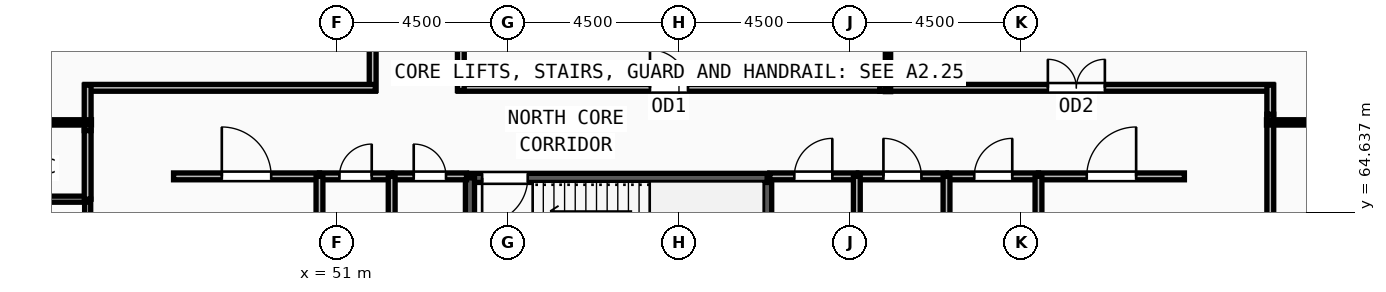
"""IFC4 building model, lengths in metres.
Left out: names, types, materials, properties, quantities, classifications, styles, units other than length and angle.
Written with IfcOpenShell. Run it as: python <this file> out.ifc"""

import sys

from ifc_helpers import new_model, si_unit, direction, frame, frame_2d, origin, place, context, subcontext, project, spatial, rectangle, extrude, source, transform, mapped, element, fill, save


model = new_model("IFC4")
c1 = context("Model", 3, precision=1e-05, world=origin(), true_north=direction((0.0, 1.0)))
c2 = subcontext(c1, "Body", "Model", "MODEL_VIEW")
j1 = project(units=[si_unit("LENGTHUNIT", "METRE"), si_unit("PLANEANGLEUNIT", "RADIAN")], contexts=[c1])
p1 = place(None, origin())
s1 = spatial("IfcSite", under=j1, at=p1, CompositionType="ELEMENT")
p2 = place(p1, origin())
s2 = spatial("IfcBuilding", under=s1, at=p2, CompositionType="ELEMENT")
p3 = place(p2, frame((0.0, 0.0, 286.5)))
s3 = spatial("IfcBuildingStorey", under=s2, at=p3, CompositionType="ELEMENT", Elevation=286.5)
p4 = place(p3, frame((62.32, 62.1, 0.0), z_axis=(0.0, 0.0, 1.0), x_axis=(0.0, 1.0, 0.0)))
e1 = element("IfcWall", 1, at=p4, inside=s3, PredefinedType="SOLIDWALL", context=c2, shape_type="SweptSolid", body=[
    extrude(rectangle(XDim=3.44, YDim=0.24, at=frame_2d((1.72, 0.0))), origin(), (0.0, 0.0, 1.0), 3.57),
])
p5 = place(p3, frame((62.32, 65.54, 0.0), z_axis=(0.0, 0.0, 1.0), x_axis=(-1.0, 0.0, 0.0)))
e2 = element("IfcWall", 2, at=p5, inside=s3, PredefinedType="SOLIDWALL", context=c2, shape_type="SweptSolid", body=[
    extrude(rectangle(XDim=7.82, YDim=0.24, at=frame_2d((3.91, 0.0))), origin(), (0.0, 0.0, 1.0), 3.57),
])
m1 = source(origin(), c2, "Body", "SweptSolid", [
    extrude(rectangle(XDim=1.2, YDim=2.2, at=frame_2d((0.6, 1.1))), frame((0.0, 0.13, 0.0), z_axis=(0.0, -1.0, 0.0), x_axis=(1.0, 0.0, 0.0)), (0.0, 0.0, 1.0), 0.26),
])
p6 = place(p5, frame((6.3, 0.0, 0.0)))
e3 = element("IfcOpeningElement", 3, at=p6, cuts=e2, PredefinedType="OPENING", context=c2, shape_type="MappedRepresentation", body=[
    mapped(m1, transform((0.0, 0.0, 0.0), x_axis=(1.0, 0.0, 0.0), y_axis=(0.0, 1.0, 0.0), z_axis=(0.0, 0.0, 1.0), scale=1.0)),
])
p7 = place(p3, frame((54.5, 65.54, 0.0), z_axis=(0.0, 0.0, 1.0), x_axis=(0.0, -1.0, 0.0)))
e4 = element("IfcWall", 4, at=p7, inside=s3, PredefinedType="SOLIDWALL", context=c2, shape_type="SweptSolid", body=[
    extrude(rectangle(XDim=3.44, YDim=0.24, at=frame_2d((1.72, 0.0))), origin(), (0.0, 0.0, 1.0), 3.57),
])
p8 = place(p3, frame((44.44, 62.24, 0.0), z_axis=(0.0, 0.0, 1.0), x_axis=(0.0, 1.0, 0.0)))
e5 = element("IfcWall", 5, at=p8, inside=s3, PredefinedType="PARTITIONING", context=c2, shape_type="SweptSolid", body=[
    extrude(rectangle(XDim=2.74, YDim=0.16, at=frame_2d((1.37, 0.0))), origin(), (0.0, 0.0, 1.0), 3.57),
])
m2 = source(origin(), c2, "Body", "SweptSolid", [
    extrude(rectangle(XDim=1.05, YDim=2.15, at=frame_2d((0.525, 1.075))), frame((0.0, 0.09, 0.0), z_axis=(0.0, -1.0, 0.0), x_axis=(1.0, 0.0, 0.0)), (0.0, 0.0, 1.0), 0.18),
])
p9 = place(p8, frame((0.845, 0.0, 0.0)))
e6 = element("IfcOpeningElement", 6, at=p9, cuts=e5, PredefinedType="OPENING", context=c2, shape_type="MappedRepresentation", body=[
    mapped(m2, transform((0.0, 0.0, 0.0), x_axis=(1.0, 0.0, 0.0), y_axis=(0.0, 1.0, 0.0), z_axis=(0.0, 0.0, 1.0), scale=1.0)),
])
p10 = place(p3, frame((50.54, 65.58, 0.0), z_axis=(0.0, 0.0, 1.0), x_axis=(1.0, 0.0, 0.0)))
e7 = element("IfcWall", 7, at=p10, inside=s3, PredefinedType="PARTITIONING", context=c2, shape_type="SweptSolid", body=[
    extrude(rectangle(XDim=1.9, YDim=0.18, at=frame_2d((0.95, 0.0))), origin(), (0.0, 0.0, 1.0), 3.57),
])
m3 = source(origin(), c2, "Body", "SweptSolid", [
    extrude(rectangle(XDim=0.85, YDim=2.1, at=frame_2d((0.425, 1.05))), frame((0.0, 0.1, 0.0), z_axis=(0.0, -1.0, 0.0), x_axis=(1.0, 0.0, 0.0)), (0.0, 0.0, 1.0), 0.2),
])
p11 = place(p10, frame((0.525, 0.0, 0.0)))
e8 = element("IfcOpeningElement", 8, at=p11, cuts=e7, PredefinedType="OPENING", context=c2, shape_type="MappedRepresentation", body=[
    mapped(m3, transform((0.0, 0.0, 0.0), x_axis=(1.0, 0.0, 0.0), y_axis=(0.0, 1.0, 0.0), z_axis=(0.0, 0.0, 1.0), scale=1.0)),
])
p12 = place(p3, frame((52.48, 65.58, 0.0), z_axis=(0.0, 0.0, 1.0), x_axis=(1.0, 0.0, 0.0)))
e9 = element("IfcWall", 9, at=p12, inside=s3, PredefinedType="PARTITIONING", context=c2, shape_type="SweptSolid", body=[
    extrude(rectangle(XDim=1.93, YDim=0.18, at=frame_2d((0.965, 0.0))), origin(), (0.0, 0.0, 1.0), 3.57),
])
p13 = place(p12, frame((0.54, 0.0, 0.0)))
e10 = element("IfcOpeningElement", 10, at=p13, cuts=e9, PredefinedType="OPENING", context=c2, shape_type="MappedRepresentation", body=[
    mapped(m3, transform((0.0, 0.0, 0.0), x_axis=(1.0, 0.0, 0.0), y_axis=(0.0, 1.0, 0.0), z_axis=(0.0, 0.0, 1.0), scale=1.0)),
])
p14 = place(p3, frame((62.39, 65.58, 0.0), z_axis=(0.0, 0.0, 1.0), x_axis=(1.0, 0.0, 0.0)))
e11 = element("IfcWall", 11, at=p14, inside=s3, PredefinedType="PARTITIONING", context=c2, shape_type="SweptSolid", body=[
    extrude(rectangle(XDim=2.29, YDim=0.18, at=frame_2d((1.145, 0.0))), origin(), (0.0, 0.0, 1.0), 3.57),
])
m4 = source(origin(), c2, "Body", "SweptSolid", [
    extrude(rectangle(XDim=1.0, YDim=2.2, at=frame_2d((0.5, 1.1))), frame((0.0, 0.1, 0.0), z_axis=(0.0, -1.0, 0.0), x_axis=(1.0, 0.0, 0.0)), (0.0, 0.0, 1.0), 0.2),
])
p15 = place(p14, frame((0.645, 0.0, 0.0)))
e12 = element("IfcOpeningElement", 12, at=p15, cuts=e11, PredefinedType="OPENING", context=c2, shape_type="MappedRepresentation", body=[
    mapped(m4, transform((0.0, 0.0, 0.0), x_axis=(1.0, 0.0, 0.0), y_axis=(0.0, 1.0, 0.0), z_axis=(0.0, 0.0, 1.0), scale=1.0)),
])
p16 = place(p3, frame((64.72, 65.58, 0.0), z_axis=(0.0, 0.0, 1.0), x_axis=(1.0, 0.0, 0.0)))
e13 = element("IfcWall", 13, at=p16, inside=s3, PredefinedType="PARTITIONING", context=c2, shape_type="SweptSolid", body=[
    extrude(rectangle(XDim=2.32, YDim=0.18, at=frame_2d((1.16, 0.0))), origin(), (0.0, 0.0, 1.0), 3.57),
])
p17 = place(p16, frame((0.66, 0.0, 0.0)))
e14 = element("IfcOpeningElement", 14, at=p17, cuts=e13, PredefinedType="OPENING", context=c2, shape_type="MappedRepresentation", body=[
    mapped(m4, transform((0.0, 0.0, 0.0), x_axis=(1.0, 0.0, 0.0), y_axis=(0.0, 1.0, 0.0), z_axis=(0.0, 0.0, 1.0), scale=1.0)),
])
p18 = place(p3, frame((67.08, 65.58, 0.0), z_axis=(0.0, 0.0, 1.0), x_axis=(1.0, 0.0, 0.0)))
e15 = element("IfcWall", 15, at=p18, inside=s3, PredefinedType="PARTITIONING", context=c2, shape_type="SweptSolid", body=[
    extrude(rectangle(XDim=2.38, YDim=0.18, at=frame_2d((1.19, 0.0))), origin(), (0.0, 0.0, 1.0), 3.57),
])
p19 = place(p18, frame((0.69, 0.0, 0.0)))
e16 = element("IfcOpeningElement", 16, at=p19, cuts=e15, PredefinedType="OPENING", context=c2, shape_type="MappedRepresentation", body=[
    mapped(m4, transform((0.0, 0.0, 0.0), x_axis=(1.0, 0.0, 0.0), y_axis=(0.0, 1.0, 0.0), z_axis=(0.0, 0.0, 1.0), scale=1.0)),
])
p20 = place(p3, frame((46.7, 65.58, 0.0), z_axis=(0.0, 0.0, 1.0), x_axis=(1.0, 0.0, 0.0)))
e17 = element("IfcWall", 17, at=p20, inside=s3, PredefinedType="PARTITIONING", context=c2, shape_type="SweptSolid", body=[
    extrude(rectangle(XDim=3.84, YDim=0.18, at=frame_2d((1.92, 0.0))), origin(), (0.0, 0.0, 1.0), 3.57),
])
m5 = source(origin(), c2, "Body", "SweptSolid", [
    extrude(rectangle(XDim=1.3, YDim=2.2, at=frame_2d((0.65, 1.1))), frame((0.0, 0.1, 0.0), z_axis=(0.0, -1.0, 0.0), x_axis=(1.0, 0.0, 0.0)), (0.0, 0.0, 1.0), 0.2),
])
p21 = place(p20, frame((1.27, 0.0, 0.0)))
e18 = element("IfcOpeningElement", 18, at=p21, cuts=e17, PredefinedType="OPENING", context=c2, shape_type="MappedRepresentation", body=[
    mapped(m5, transform((0.0, 0.0, 0.0), x_axis=(1.0, 0.0, 0.0), y_axis=(0.0, 1.0, 0.0), z_axis=(0.0, 0.0, 1.0), scale=1.0)),
])
p22 = place(p3, frame((69.46, 65.58, 0.0), z_axis=(0.0, 0.0, 1.0), x_axis=(1.0, 0.0, 0.0)))
e19 = element("IfcWall", 19, at=p22, inside=s3, PredefinedType="PARTITIONING", context=c2, shape_type="SweptSolid", body=[
    extrude(rectangle(XDim=3.84, YDim=0.18, at=frame_2d((1.92, 0.0))), origin(), (0.0, 0.0, 1.0), 3.57),
])
p23 = place(p22, frame((1.27, 0.0, 0.0)))
e20 = element("IfcOpeningElement", 20, at=p23, cuts=e19, PredefinedType="OPENING", context=c2, shape_type="MappedRepresentation", body=[
    mapped(m5, transform((0.0, 0.0, 0.0), x_axis=(1.0, 0.0, 0.0), y_axis=(0.0, 1.0, 0.0), z_axis=(0.0, 0.0, 1.0), scale=1.0)),
])
p24 = place(p3, frame((75.56, 67.215, 0.0), z_axis=(0.0, 0.0, 1.0), x_axis=(0.0, -1.0, 0.0)))
e21 = element("IfcWall", 21, at=p24, inside=s3, PredefinedType="PARTITIONING", context=c2, shape_type="SweptSolid", body=[
    extrude(rectangle(XDim=13.93, YDim=0.18, at=frame_2d((6.965, 0.0))), origin(), (0.0, 0.0, 1.0), 3.57),
])
m6 = source(origin(), c2, "Body", "SweptSolid", [
    extrude(rectangle(XDim=1.5, YDim=2.2, at=frame_2d((0.75, 1.1))), frame((0.0, 0.1, 0.0), z_axis=(0.0, -1.0, 0.0), x_axis=(1.0, 0.0, 0.0)), (0.0, 0.0, 1.0), 0.2),
])
p25 = place(p24, frame((6.215, 0.0, 0.0)))
e22 = element("IfcOpeningElement", 22, at=p25, cuts=e21, PredefinedType="OPENING", context=c2, shape_type="MappedRepresentation", body=[
    mapped(m6, transform((0.0, 0.0, 0.0), x_axis=(1.0, 0.0, 0.0), y_axis=(0.0, 1.0, 0.0), z_axis=(0.0, 0.0, 1.0), scale=1.0)),
])
p26 = place(p3, frame((65.285, 67.91, 0.0), z_axis=(0.0, 0.0, 1.0), x_axis=(1.0, 0.0, 0.0)))
e23 = element("IfcWall", 23, at=p26, inside=s3, PredefinedType="PARTITIONING", context=c2, shape_type="SweptSolid", body=[
    extrude(rectangle(XDim=10.345, YDim=0.18, at=frame_2d((5.172, 0.0))), origin(), (0.0, 0.0, 1.0), 3.261),
])
p27 = place(p26, frame((4.422, 0.0, 0.0)))
e24 = element("IfcOpeningElement", 24, at=p27, cuts=e23, PredefinedType="OPENING", context=c2, shape_type="MappedRepresentation", body=[
    mapped(m6, transform((0.0, 0.0, 0.0), x_axis=(1.0, 0.0, 0.0), y_axis=(0.0, 1.0, 0.0), z_axis=(0.0, 0.0, 1.0), scale=1.0)),
])
p28 = place(p3, frame((54.19, 67.91, 0.0), z_axis=(0.0, 0.0, 1.0), x_axis=(1.0, 0.0, 0.0)))
e25 = element("IfcWall", 25, at=p28, inside=s3, PredefinedType="PARTITIONING", context=c2, shape_type="SweptSolid", body=[
    extrude(rectangle(XDim=11.095, YDim=0.18, at=frame_2d((5.547, 0.0))), origin(), (0.0, 0.0, 1.0), 3.261),
])
p29 = place(p28, frame((5.047, 0.0, 0.0)))
e26 = element("IfcOpeningElement", 26, at=p29, cuts=e25, PredefinedType="OPENING", context=c2, shape_type="MappedRepresentation", body=[
    mapped(m4, transform((0.0, 0.0, 0.0), x_axis=(1.0, 0.0, 0.0), y_axis=(0.0, 1.0, 0.0), z_axis=(0.0, 0.0, 1.0), scale=1.0)),
])
p30 = place(p3, frame((51.94, 67.84, 0.0), z_axis=(0.0, 0.0, 1.0), x_axis=(0.0, 1.0, 0.0)))
e27 = element("IfcWall", 27, at=p30, inside=s3, PredefinedType="PARTITIONING", context=c2, shape_type="SweptSolid", body=[
    extrude(rectangle(XDim=8.437, YDim=0.18, at=frame_2d((4.219, 0.0))), origin(), (0.0, 0.0, 1.0), 3.57),
])
p31 = place(p30, frame((3.468, 0.0, 0.0)))
e28 = element("IfcOpeningElement", 28, at=p31, cuts=e27, PredefinedType="OPENING", context=c2, shape_type="MappedRepresentation", body=[
    mapped(m6, transform((0.0, 0.0, 0.0), x_axis=(1.0, 0.0, 0.0), y_axis=(0.0, 1.0, 0.0), z_axis=(0.0, 0.0, 1.0), scale=1.0)),
])
p32 = place(p3, frame((39.98, 64.98, 0.0), z_axis=(0.0, 0.0, 1.0), x_axis=(1.0, 0.0, 0.0)))
e29 = element("IfcWall", 29, at=p32, inside=s3, PredefinedType="PARTITIONING", context=c2, shape_type="SweptSolid", body=[
    extrude(rectangle(XDim=4.46, YDim=0.16, at=frame_2d((2.23, 0.0))), origin(), (0.0, 0.0, 1.0), 3.57),
])
p33 = place(p3, frame((50.54, 61.95, 0.0), z_axis=(0.0, 0.0, 1.0), x_axis=(0.0, 1.0, 0.0)))
e30 = element("IfcWall", 30, at=p33, inside=s3, PredefinedType="PARTITIONING", context=c2, shape_type="SweptSolid", body=[
    extrude(rectangle(XDim=3.63, YDim=0.18, at=frame_2d((1.815, 0.0))), origin(), (0.0, 0.0, 1.0), 3.57),
])
for number, where, z_axis, x_axis in (
    (31, (52.44, 61.775, 0.0), (0.0, 0.0, 1.0), (0.0, 1.0, 0.0)),
    (32, (64.68, 61.775, 0.0), (0.0, 0.0, 1.0), (0.0, 1.0, 0.0)),
    (33, (67.04, 61.775, 0.0), (0.0, 0.0, 1.0), (0.0, 1.0, 0.0)),
):
    element("IfcWall", number, at=place(p3, frame(where, z_axis=z_axis, x_axis=x_axis)), inside=s3, PredefinedType="PARTITIONING", context=c2, shape_type="SweptSolid", body=[
        extrude(rectangle(XDim=3.805, YDim=0.18, at=frame_2d((1.903, 0.0))), origin(), (0.0, 0.0, 1.0), 3.57),
    ])
p34 = place(p3, frame((69.46, 61.95, 0.0), z_axis=(0.0, 0.0, 1.0), x_axis=(0.0, 1.0, 0.0)))
e34 = element("IfcWall", 34, at=p34, inside=s3, PredefinedType="PARTITIONING", context=c2, shape_type="SweptSolid", body=[
    extrude(rectangle(XDim=3.63, YDim=0.18, at=frame_2d((1.815, 0.0))), origin(), (0.0, 0.0, 1.0), 3.57),
])
p35 = place(p3, frame((75.56, 67.98, 0.0), z_axis=(0.0, 0.0, 1.0), x_axis=(0.0, -1.0, 0.0)))
e35 = element("IfcWall", 35, at=p35, inside=s3, PredefinedType="PARTITIONING", context=c2, shape_type="SweptSolid", body=[
    extrude(rectangle(XDim=0.765, YDim=0.18, at=frame_2d((0.382, 0.0))), origin(), (0.0, 0.0, 1.0), 3.57),
])
p36 = place(p3, frame((54.26, 76.431, 0.0), z_axis=(0.0, 0.0, 1.0), x_axis=(0.0, -1.0, 0.0)))
e36 = element("IfcWall", 36, at=p36, inside=s3, PredefinedType="PARTITIONING", context=c2, shape_type="SweptSolid", body=[
    extrude(rectangle(XDim=8.591, YDim=0.18, at=frame_2d((4.295, 0.0))), origin(), (0.0, 0.0, 1.0), 3.57),
])
p37 = place(p3, frame((44.37, 67.91, 0.0), z_axis=(0.0, 0.0, 1.0), x_axis=(1.0, 0.0, 0.0)))
e37 = element("IfcWall", 37, at=p37, inside=s3, PredefinedType="PARTITIONING", context=c2, shape_type="SweptSolid", body=[
    extrude(rectangle(XDim=7.64, YDim=0.18, at=frame_2d((3.82, 0.0))), origin(), (0.0, 0.0, 1.0), 3.57),
])
p38 = place(p3, frame((44.44, 66.785, 0.0), z_axis=(0.0, 0.0, 1.0), x_axis=(0.0, 1.0, 0.0)))
e38 = element("IfcWall", 38, at=p38, inside=s3, PredefinedType="PARTITIONING", context=c2, shape_type="SweptSolid", body=[
    extrude(rectangle(XDim=1.195, YDim=0.18, at=frame_2d((0.598, 0.0))), origin(), (0.0, 0.0, 1.0), 3.57),
])
p39 = place(p3, frame((44.44, 64.98, 0.0), z_axis=(0.0, 0.0, 1.0), x_axis=(0.0, 1.0, 0.0)))
e39 = element("IfcWall", 39, at=p39, inside=s3, PredefinedType="PARTITIONING", context=c2, shape_type="SweptSolid", body=[
    extrude(rectangle(XDim=1.805, YDim=0.18, at=frame_2d((0.902, 0.0))), origin(), (0.0, 0.0, 1.0), 3.57),
])
for number, where, z_axis, x_axis in (
    (40, (44.54, 67.0, 0.0), (0.0, 0.0, 1.0), (-1.0, 0.0, 0.0)),
    (41, (75.46, 67.0, 0.0), (0.0, 0.0, 1.0), (1.0, 0.0, 0.0)),
):
    element("IfcWall", number, at=place(p3, frame(where, z_axis=z_axis, x_axis=x_axis)), inside=s3, PredefinedType="PARTITIONING", context=c2, shape_type="SweptSolid", body=[
        extrude(rectangle(XDim=15.021, YDim=0.14, at=frame_2d((7.51, 0.0))), origin(), (0.0, 0.0, 1.0), 3.57),
    ])
p40 = place(p3, frame((65.5, 67.81, 0.0), z_axis=(0.0, 0.0, 1.0), x_axis=(0.0, 1.0, 0.0)))
e42 = element("IfcWall", 42, at=p40, inside=s3, PredefinedType="PARTITIONING", context=c2, shape_type="SweptSolid", body=[
    extrude(rectangle(XDim=8.999, YDim=0.14, at=frame_2d((4.5, 0.0))), origin(), (0.0, 0.0, 1.0), 3.57),
])
m7 = source(origin(), c2, "Body", "SweptSolid", [
    extrude(rectangle(XDim=1.2, YDim=2.2, at=frame_2d((0.6, 1.1))), frame((0.0, 0.025, 0.0), z_axis=(0.0, -1.0, 0.0), x_axis=(1.0, 0.0, 0.0)), (0.0, 0.0, 1.0), 0.05),
])
p41 = place(p6, origin())
e43 = element("IfcDoor", 43, at=p41, inside=s3, OperationType="SINGLE_SWING_RIGHT", PredefinedType="DOOR", context=c2, shape_type="MappedRepresentation", body=[
    mapped(m7, transform((0.0, 0.0, 0.0), x_axis=(1.0, 0.0, 0.0), y_axis=(0.0, 1.0, 0.0), z_axis=(0.0, 0.0, 1.0), scale=1.0)),
])
fill(e3, e43)
m8 = source(origin(), c2, "Body", "SweptSolid", [
    extrude(rectangle(XDim=0.85, YDim=2.1, at=frame_2d((0.425, 1.05))), frame((0.0, 0.025, 0.0), z_axis=(0.0, -1.0, 0.0), x_axis=(1.0, 0.0, 0.0)), (0.0, 0.0, 1.0), 0.05),
])
p42 = place(p11, origin())
e44 = element("IfcDoor", 44, at=p42, inside=s3, OperationType="SINGLE_SWING_RIGHT", PredefinedType="DOOR", context=c2, shape_type="MappedRepresentation", body=[
    mapped(m8, transform((0.0, 0.0, 0.0), x_axis=(1.0, 0.0, 0.0), y_axis=(0.0, 1.0, 0.0), z_axis=(0.0, 0.0, 1.0), scale=1.0)),
])
fill(e8, e44)
p43 = place(p13, origin())
e45 = element("IfcDoor", 45, at=p43, inside=s3, OperationType="SINGLE_SWING_LEFT", PredefinedType="DOOR", context=c2, shape_type="MappedRepresentation", body=[
    mapped(m8, transform((0.0, 0.0, 0.0), x_axis=(1.0, 0.0, 0.0), y_axis=(0.0, 1.0, 0.0), z_axis=(0.0, 0.0, 1.0), scale=1.0)),
])
fill(e10, e45)
m9 = source(origin(), c2, "Body", "SweptSolid", [
    extrude(rectangle(XDim=1.0, YDim=2.2, at=frame_2d((0.5, 1.1))), frame((0.0, 0.025, 0.0), z_axis=(0.0, -1.0, 0.0), x_axis=(1.0, 0.0, 0.0)), (0.0, 0.0, 1.0), 0.05),
])
p44 = place(p15, origin())
e46 = element("IfcDoor", 46, at=p44, inside=s3, OperationType="SINGLE_SWING_RIGHT", PredefinedType="DOOR", context=c2, shape_type="MappedRepresentation", body=[
    mapped(m9, transform((0.0, 0.0, 0.0), x_axis=(1.0, 0.0, 0.0), y_axis=(0.0, 1.0, 0.0), z_axis=(0.0, 0.0, 1.0), scale=1.0)),
])
fill(e12, e46)
p45 = place(p17, origin())
e47 = element("IfcDoor", 47, at=p45, inside=s3, OperationType="SINGLE_SWING_LEFT", PredefinedType="DOOR", context=c2, shape_type="MappedRepresentation", body=[
    mapped(m9, transform((0.0, 0.0, 0.0), x_axis=(1.0, 0.0, 0.0), y_axis=(0.0, 1.0, 0.0), z_axis=(0.0, 0.0, 1.0), scale=1.0)),
])
fill(e14, e47)
p46 = place(p19, origin())
e48 = element("IfcDoor", 48, at=p46, inside=s3, OperationType="SINGLE_SWING_RIGHT", PredefinedType="DOOR", context=c2, shape_type="MappedRepresentation", body=[
    mapped(m9, transform((0.0, 0.0, 0.0), x_axis=(1.0, 0.0, 0.0), y_axis=(0.0, 1.0, 0.0), z_axis=(0.0, 0.0, 1.0), scale=1.0)),
])
fill(e16, e48)
m10 = source(origin(), c2, "Body", "SweptSolid", [
    extrude(rectangle(XDim=1.3, YDim=2.2, at=frame_2d((0.65, 1.1))), frame((0.0, 0.025, 0.0), z_axis=(0.0, -1.0, 0.0), x_axis=(1.0, 0.0, 0.0)), (0.0, 0.0, 1.0), 0.05),
])
p47 = place(p21, origin())
e49 = element("IfcDoor", 49, at=p47, inside=s3, OperationType="SINGLE_SWING_LEFT", PredefinedType="DOOR", context=c2, shape_type="MappedRepresentation", body=[
    mapped(m10, transform((0.0, 0.0, 0.0), x_axis=(1.0, 0.0, 0.0), y_axis=(0.0, 1.0, 0.0), z_axis=(0.0, 0.0, 1.0), scale=1.0)),
])
fill(e18, e49)
p48 = place(p23, origin())
e50 = element("IfcDoor", 50, at=p48, inside=s3, OperationType="SINGLE_SWING_RIGHT", PredefinedType="DOOR", context=c2, shape_type="MappedRepresentation", body=[
    mapped(m10, transform((0.0, 0.0, 0.0), x_axis=(1.0, 0.0, 0.0), y_axis=(0.0, 1.0, 0.0), z_axis=(0.0, 0.0, 1.0), scale=1.0)),
])
fill(e20, e50)
m11 = source(origin(), c2, "Body", "SweptSolid", [
    extrude(rectangle(XDim=1.5, YDim=2.2, at=frame_2d((0.75, 1.1))), frame((0.0, 0.025, 0.0), z_axis=(0.0, -1.0, 0.0), x_axis=(1.0, 0.0, 0.0)), (0.0, 0.0, 1.0), 0.05),
])
p49 = place(p27, origin())
e51 = element("IfcDoor", 51, at=p49, inside=s3, OperationType="DOUBLE_DOOR_SINGLE_SWING", PredefinedType="DOOR", context=c2, shape_type="MappedRepresentation", body=[
    mapped(m11, transform((0.0, 0.0, 0.0), x_axis=(1.0, 0.0, 0.0), y_axis=(0.0, 1.0, 0.0), z_axis=(0.0, 0.0, 1.0), scale=1.0)),
])
fill(e24, e51)
p50 = place(p29, origin())
e52 = element("IfcDoor", 52, at=p50, inside=s3, OperationType="SINGLE_SWING_LEFT", PredefinedType="DOOR", context=c2, shape_type="MappedRepresentation", body=[
    mapped(m9, transform((0.0, 0.0, 0.0), x_axis=(1.0, 0.0, 0.0), y_axis=(0.0, 1.0, 0.0), z_axis=(0.0, 0.0, 1.0), scale=1.0)),
])
fill(e26, e52)
save(model, sys.argv[1])
